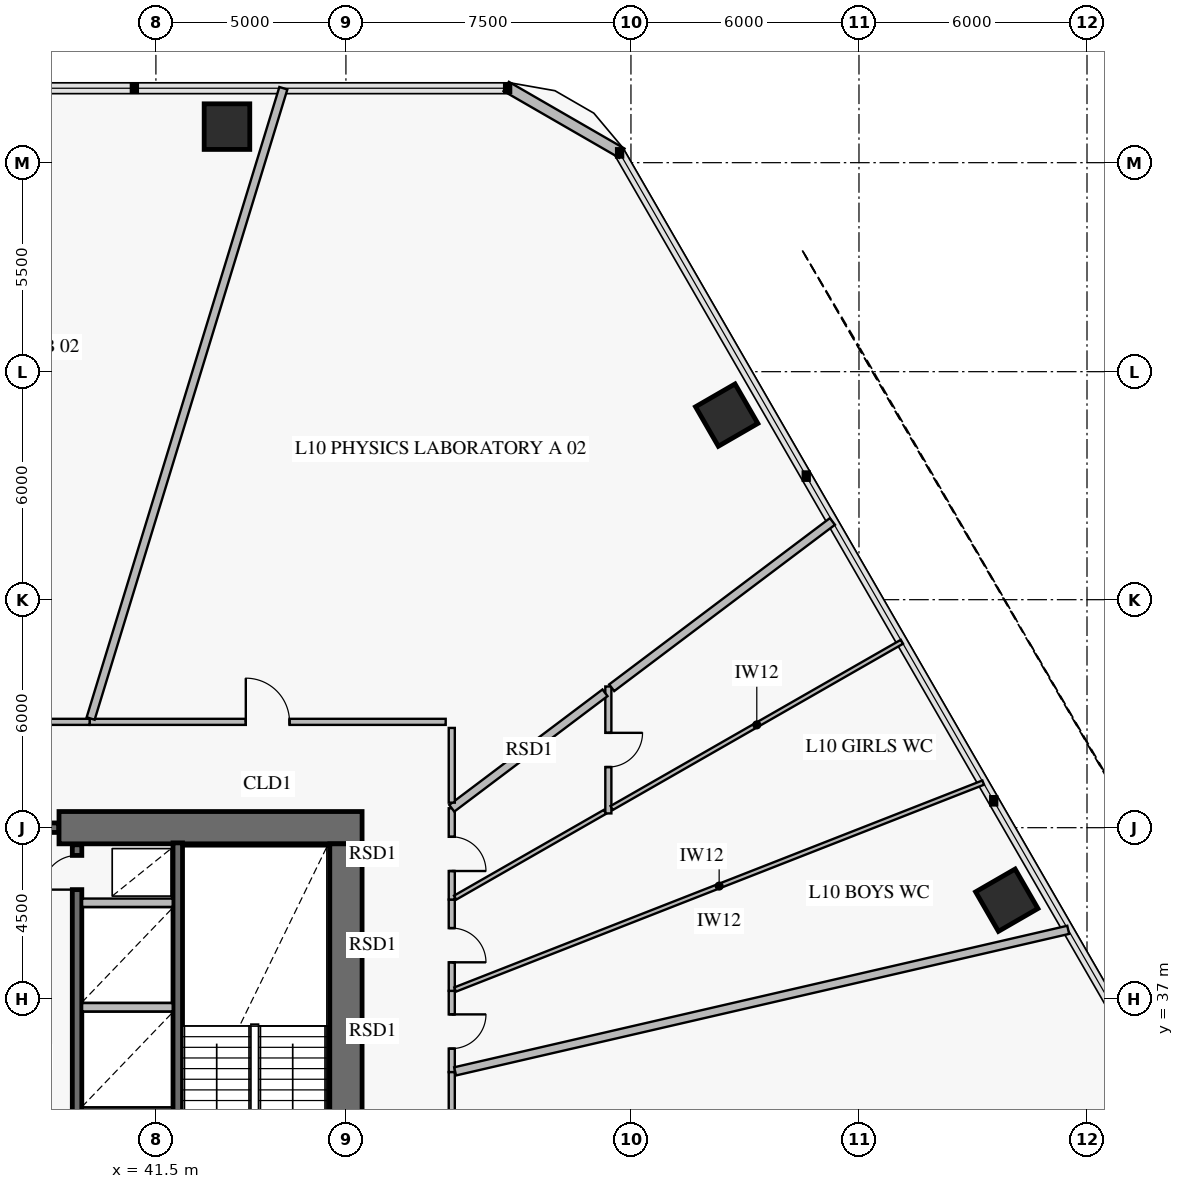
"""IFC4 building model, lengths in metres.
Left out: names, types, materials, properties, quantities, classifications, styles, units other than length and angle.
Written with IfcOpenShell. Run it as: python <this file> out.ifc"""

import sys

from ifc_helpers import new_model, si_unit, direction, frame, frame_2d, origin, origin_2d, place, context, subcontext, project, spatial, rectangle, extrude, element, fill, save


model = new_model("IFC4")
c1 = context("Model", 3, precision=1e-05, world=origin(), true_north=direction((0.0, 1.0)))
c2 = subcontext(c1, "Body", "Model", "MODEL_VIEW")
j1 = project(units=[si_unit("LENGTHUNIT", "METRE"), si_unit("PLANEANGLEUNIT", "RADIAN")], contexts=[c1])
p1 = place(None, origin())
s1 = spatial("IfcSite", under=j1, at=p1, CompositionType="ELEMENT")
p2 = place(p1, origin())
s2 = spatial("IfcBuilding", under=s1, at=p2, CompositionType="ELEMENT")
p3 = place(p2, frame((0.0, 0.0, 41.4)))
s3 = spatial("IfcBuildingStorey", under=s2, at=p3, CompositionType="ELEMENT", Elevation=41.4)
p4 = place(p3, frame((46.925, 41.5, 0.0), z_axis=(0.0, 0.0, 1.0), x_axis=(-1.0, 0.0, 0.0)))
e1 = element("IfcWall", 1, at=p4, inside=s3, PredefinedType="SHEAR", context=c2, shape_type="SweptSolid", body=[
    extrude(rectangle(XDim=7.975, YDim=0.85, at=frame_2d((3.988, 0.0))), origin(), (0.0, 0.0, 1.0), 4.2),
])
p5 = place(p3, frame((46.5, 22.925, 0.0), z_axis=(0.0, 0.0, 1.0), x_axis=(0.0, 1.0, 0.0)))
e2 = element("IfcWall", 2, at=p5, inside=s3, PredefinedType="SHEAR", context=c2, shape_type="SweptSolid", body=[
    extrude(rectangle(XDim=18.15, YDim=0.85, at=frame_2d((9.075, 0.0))), origin(), (0.0, 0.0, 1.0), 4.2),
])
p6 = place(p5, frame((8.825, 0.0, 0.0)))
e3 = element("IfcOpeningElement", 3, at=p6, cuts=e2, PredefinedType="OPENING", context=c2, shape_type="SweptSolid", body=[
    extrude(rectangle(XDim=1.1, YDim=2.15, at=frame_2d((0.55, 1.075))), frame((0.0, 0.437, 0.0), z_axis=(0.0, -1.0, 0.0), x_axis=(1.0, 0.0, 0.0)), (0.0, 0.0, 1.0), 0.874),
])
for number, where, z_axis, x_axis in (
    (4, (63.889, 39.592, 0.0), (0.0, 0.0, 1.0), (-0.5, 0.866, 0.0)),
    (5, (56.519, 52.357, 0.0), (0.0, 0.0, 1.0), (-0.5, 0.866, 0.0)),
    (6, (43.37, 59.948, 0.0), (0.0, 0.0, 1.0), (-1.0, 0.0, 0.0)),
):
    element("IfcColumn", number, at=place(p3, frame(where, z_axis=z_axis, x_axis=x_axis)), inside=s3, PredefinedType="COLUMN", context=c2, shape_type="SweptSolid", body=[
        extrude(rectangle(XDim=1.2, YDim=1.2, at=origin_2d()), origin(), (0.0, 0.0, 1.0), 3.92),
    ])
p7 = place(p3, frame((50.717, 61.006, 0.0), z_axis=(0.0, 0.0, 1.0), x_axis=(0.866007452331, -0.500031091541, 0.0)))
e7 = element("IfcWall", 7, at=p7, inside=s3, PredefinedType="SOLIDWALL", context=c2, shape_type="SweptSolid", body=[
    extrude(rectangle(XDim=3.515, YDim=0.28, at=frame_2d((1.757, 0.0))), origin(), (0.0, 0.0, 1.0), 3.92),
])
p8 = place(p3, frame((36.76, 41.5, 0.0), z_axis=(0.0, 0.0, 1.0), x_axis=(1.0, 0.0, 0.0)))
e8 = element("IfcWall", 8, at=p8, inside=s3, PredefinedType="SOLIDWALL", context=c2, shape_type="SweptSolid", body=[
    extrude(rectangle(XDim=2.18, YDim=0.25, at=frame_2d((1.09, 0.0))), origin(), (0.0, 0.0, 1.0), 4.2),
])
p9 = place(p8, frame((0.34, 0.0, 0.0)))
e9 = element("IfcOpeningElement", 9, at=p9, cuts=e8, PredefinedType="OPENING", context=c2, shape_type="SweptSolid", body=[
    extrude(rectangle(XDim=1.5, YDim=2.15, at=frame_2d((0.75, 1.075))), frame((0.0, 0.137, 0.0), z_axis=(0.0, -1.0, 0.0), x_axis=(1.0, 0.0, 0.0)), (0.0, 0.0, 1.0), 0.274),
])
p10 = place(p3, frame((42.075, 31.4, 0.0), z_axis=(0.0, 0.0, 1.0), x_axis=(0.0, 1.0, 0.0)))
e10 = element("IfcWall", 10, at=p10, inside=s3, PredefinedType="SOLIDWALL", context=c2, shape_type="SweptSolid", body=[
    extrude(rectangle(XDim=9.7, YDim=0.25, at=frame_2d((4.85, 0.0))), origin(), (0.0, 0.0, 1.0), 4.2),
])
p11 = place(p3, frame((39.425, 31.4, 0.0), z_axis=(0.0, 0.0, 1.0), x_axis=(0.0, 1.0, 0.0)))
e11 = element("IfcWall", 11, at=p11, inside=s3, PredefinedType="SOLIDWALL", context=c2, shape_type="SweptSolid", body=[
    extrude(rectangle(XDim=9.65, YDim=0.25, at=frame_2d((4.825, 0.0))), origin(), (0.0, 0.0, 1.0), 4.2),
])
p12 = place(p11, frame((8.47, 0.0, 0.0)))
e12 = element("IfcOpeningElement", 12, at=p12, cuts=e11, PredefinedType="OPENING", context=c2, shape_type="SweptSolid", body=[
    extrude(rectangle(XDim=0.9, YDim=2.1, at=frame_2d((0.45, 1.05))), frame((0.0, 0.137, 0.0), z_axis=(0.0, -1.0, 0.0), x_axis=(1.0, 0.0, 0.0)), (0.0, 0.0, 1.0), 0.274),
])
p13 = place(p3, frame((49.285, 35.067, 0.0), z_axis=(0.0, 0.0, 1.0), x_axis=(0.0, 1.0, 0.0)))
e13 = element("IfcWall", 13, at=p13, inside=s3, PredefinedType="PARTITIONING", context=c2, shape_type="SweptSolid", body=[
    extrude(rectangle(XDim=2.139, YDim=0.16, at=frame_2d((1.07, 0.0))), origin(), (0.0, 0.0, 1.0), 3.22),
])
p14 = place(p13, frame((0.62, 0.0, 0.0)))
e14 = element("IfcOpeningElement", 14, at=p14, cuts=e13, PredefinedType="OPENING", context=c2, shape_type="SweptSolid", body=[
    extrude(rectangle(XDim=0.9, YDim=2.1, at=frame_2d((0.45, 1.05))), frame((0.0, 0.092, 0.0), z_axis=(0.0, -1.0, 0.0), x_axis=(1.0, 0.0, 0.0)), (0.0, 0.0, 1.0), 0.184),
])
p15 = place(p3, frame((49.285, 37.206, 0.0), z_axis=(0.0, 0.0, 1.0), x_axis=(0.0, 1.0, 0.0)))
e15 = element("IfcWall", 15, at=p15, inside=s3, PredefinedType="PARTITIONING", context=c2, shape_type="SweptSolid", body=[
    extrude(rectangle(XDim=2.402, YDim=0.16, at=frame_2d((1.201, 0.0))), origin(), (0.0, 0.0, 1.0), 3.92),
])
p16 = place(p15, frame((0.751, 0.0, 0.0)))
e16 = element("IfcOpeningElement", 16, at=p16, cuts=e15, PredefinedType="OPENING", context=c2, shape_type="SweptSolid", body=[
    extrude(rectangle(XDim=0.9, YDim=2.1, at=frame_2d((0.45, 1.05))), frame((0.0, 0.092, 0.0), z_axis=(0.0, -1.0, 0.0), x_axis=(1.0, 0.0, 0.0)), (0.0, 0.0, 1.0), 0.184),
])
p17 = place(p3, frame((53.405, 45.216, 0.0), z_axis=(0.0, 0.0, 1.0), x_axis=(0.0, -1.0, 0.0)))
e17 = element("IfcWall", 17, at=p17, inside=s3, PredefinedType="PARTITIONING", context=c2, shape_type="SweptSolid", body=[
    extrude(rectangle(XDim=3.34, YDim=0.16, at=frame_2d((1.67, 0.0))), origin(), (0.0, 0.0, 1.0), 3.47),
])
p18 = place(p17, frame((1.22, 0.0, 0.0)))
e18 = element("IfcOpeningElement", 18, at=p18, cuts=e17, PredefinedType="OPENING", context=c2, shape_type="SweptSolid", body=[
    extrude(rectangle(XDim=0.9, YDim=2.1, at=frame_2d((0.45, 1.05))), frame((0.0, 0.092, 0.0), z_axis=(0.0, -1.0, 0.0), x_axis=(1.0, 0.0, 0.0)), (0.0, 0.0, 1.0), 0.184),
])
p19 = place(p3, frame((49.285, 39.608, 0.0), z_axis=(0.0, 0.0, 1.0), x_axis=(0.0, 1.0, 0.0)))
e19 = element("IfcWall", 19, at=p19, inside=s3, PredefinedType="PARTITIONING", context=c2, shape_type="SweptSolid", body=[
    extrude(rectangle(XDim=2.403, YDim=0.16, at=frame_2d((1.201, 0.0))), origin(), (0.0, 0.0, 1.0), 3.92),
])
p20 = place(p19, frame((0.751, 0.0, 0.0)))
e20 = element("IfcOpeningElement", 20, at=p20, cuts=e19, PredefinedType="OPENING", context=c2, shape_type="SweptSolid", body=[
    extrude(rectangle(XDim=0.9, YDim=2.1, at=frame_2d((0.45, 1.05))), frame((0.0, 0.092, 0.0), z_axis=(0.0, -1.0, 0.0), x_axis=(1.0, 0.0, 0.0)), (0.0, 0.0, 1.0), 0.184),
])
p21 = place(p3, frame((49.125, 44.285, 0.0), z_axis=(0.0, 0.0, 1.0), x_axis=(-1.0, 0.0, 0.0)))
e21 = element("IfcWall", 21, at=p21, inside=s3, PredefinedType="PARTITIONING", context=c2, shape_type="SweptSolid", body=[
    extrude(rectangle(XDim=9.369, YDim=0.16, at=frame_2d((4.685, 0.0))), origin(), (0.0, 0.0, 1.0), 3.22),
])
p22 = place(p21, frame((4.11, 0.0, 0.0)))
e22 = element("IfcOpeningElement", 22, at=p22, cuts=e21, PredefinedType="OPENING", context=c2, shape_type="SweptSolid", body=[
    extrude(rectangle(XDim=1.15, YDim=2.2, at=frame_2d((0.575, 1.1))), frame((0.0, 0.092, 0.0), z_axis=(0.0, -1.0, 0.0), x_axis=(1.0, 0.0, 0.0)), (0.0, 0.0, 1.0), 0.184),
])
p23 = place(p3, frame((39.756, 44.285, 0.0), z_axis=(0.0, 0.0, 1.0), x_axis=(-1.0, 0.0, 0.0)))
e23 = element("IfcWall", 23, at=p23, inside=s3, PredefinedType="PARTITIONING", context=c2, shape_type="SweptSolid", body=[
    extrude(rectangle(XDim=7.986, YDim=0.16, at=frame_2d((3.993, 0.0))), origin(), (0.0, 0.0, 1.0), 3.22),
])
p24 = place(p23, frame((3.418, 0.0, 0.0)))
e24 = element("IfcOpeningElement", 24, at=p24, cuts=e23, PredefinedType="OPENING", context=c2, shape_type="SweptSolid", body=[
    extrude(rectangle(XDim=1.15, YDim=2.2, at=frame_2d((0.575, 1.1))), frame((0.0, 0.092, 0.0), z_axis=(0.0, -1.0, 0.0), x_axis=(1.0, 0.0, 0.0)), (0.0, 0.0, 1.0), 0.184),
])
p25 = place(p3, frame((49.285, 21.989, 0.0), z_axis=(0.0, 0.0, 1.0), x_axis=(0.0, 1.0, 0.0)))
e25 = element("IfcWall", 25, at=p25, inside=s3, PredefinedType="PARTITIONING", context=c2, shape_type="SweptSolid", body=[
    extrude(rectangle(XDim=13.078, YDim=0.16, at=frame_2d((6.539, 0.0))), origin(), (0.0, 0.0, 1.0), 3.22),
])
p26 = place(p25, frame((6.064, 0.0, 0.0)))
e26 = element("IfcOpeningElement", 26, at=p26, cuts=e25, PredefinedType="OPENING", context=c2, shape_type="SweptSolid", body=[
    extrude(rectangle(XDim=0.95, YDim=2.1, at=frame_2d((0.475, 1.05))), frame((0.0, 0.092, 0.0), z_axis=(0.0, -1.0, 0.0), x_axis=(1.0, 0.0, 0.0)), (0.0, 0.0, 1.0), 0.184),
])
for number, where, z_axis, x_axis in (
    (27, (39.558, 34.025, 0.0), (0.0, 0.0, 1.0), (1.0, 0.0, 0.0)),
    (28, (39.558, 36.775, 0.0), (0.0, 0.0, 1.0), (1.0, 0.0, 0.0)),
    (29, (39.558, 39.525, 0.0), (0.0, 0.0, 1.0), (1.0, 0.0, 0.0)),
):
    element("IfcWall", number, at=place(p3, frame(where, z_axis=z_axis, x_axis=x_axis)), inside=s3, PredefinedType="PARTITIONING", context=c2, shape_type="SweptSolid", body=[
        extrude(rectangle(XDim=2.384, YDim=0.22, at=frame_2d((1.192, 0.0))), origin(), (0.0, 0.0, 1.0), 3.92),
    ])
p27 = place(p3, frame((49.373, 35.087, 0.0), z_axis=(0.0, 0.0, 1.0), x_axis=(0.974368575461, 0.224957505217, 0.0)))
e30 = element("IfcWall", 30, at=p27, inside=s3, PredefinedType="PARTITIONING", context=c2, shape_type="SweptSolid", body=[
    extrude(rectangle(XDim=16.557, YDim=0.22, at=frame_2d((8.278, 0.0))), origin(), (0.0, 0.0, 1.0), 3.17),
])
p28 = place(p3, frame((49.373, 37.241, 0.0), z_axis=(0.0, 0.0, 1.0), x_axis=(0.931056574404, 0.364874848761, 0.0)))
e31 = element("IfcWall", 31, at=p28, inside=s3, PredefinedType="PARTITIONING", context=c2, shape_type="SweptSolid", body=[
    extrude(rectangle(XDim=14.925, YDim=0.12, at=frame_2d((7.462, 0.0))), origin(), (0.0, 0.0, 1.0), 3.17),
])
p29 = place(p3, frame((49.373, 39.659, 0.0), z_axis=(0.0, 0.0, 1.0), x_axis=(0.867753476972, 0.496994872412, 0.0)))
e32 = element("IfcWall", 32, at=p29, inside=s3, PredefinedType="PARTITIONING", context=c2, shape_type="SweptSolid", body=[
    extrude(rectangle(XDim=4.545, YDim=0.12, at=frame_2d((2.272, 0.0))), origin(), (0.0, 0.0, 1.0), 3.92),
])
p30 = place(p3, frame((53.493, 42.018, 0.0), z_axis=(0.0, 0.0, 1.0), x_axis=(0.867773256473, 0.496960335791, 0.0)))
e33 = element("IfcWall", 33, at=p30, inside=s3, PredefinedType="PARTITIONING", context=c2, shape_type="SweptSolid", body=[
    extrude(rectangle(XDim=8.8, YDim=0.12, at=frame_2d((4.4, 0.0))), origin(), (0.0, 0.0, 1.0), 3.17),
])
p31 = place(p3, frame((49.285, 42.011, 0.0), z_axis=(0.0, 0.0, 1.0), x_axis=(0.798634234908, 0.601816715315, 0.0)))
e34 = element("IfcWall", 34, at=p31, inside=s3, PredefinedType="PARTITIONING", context=c2, shape_type="SweptSolid", body=[
    extrude(rectangle(XDim=5.049, YDim=0.22, at=frame_2d((2.524, 0.0))), origin(), (0.0, 0.0, 1.0), 3.47),
])
p32 = place(p3, frame((53.493, 45.182, 0.0), z_axis=(0.0, 0.0, 1.0), x_axis=(0.798624171574, 0.60183006952, 0.0)))
e35 = element("IfcWall", 35, at=p32, inside=s3, PredefinedType="PARTITIONING", context=c2, shape_type="SweptSolid", body=[
    extrude(rectangle(XDim=7.272, YDim=0.22, at=frame_2d((3.636, 0.0))), origin(), (0.0, 0.0, 1.0), 3.17),
])
p33 = place(p3, frame((39.783, 44.373, 0.0), z_axis=(0.0, 0.0, 1.0), x_axis=(0.29237803707, 0.956302819947, 0.0)))
e36 = element("IfcWall", 36, at=p33, inside=s3, PredefinedType="PARTITIONING", context=c2, shape_type="SweptSolid", body=[
    extrude(rectangle(XDim=17.343, YDim=0.22, at=frame_2d((8.672, 0.0))), origin(), (0.0, 0.0, 1.0), 3.17),
])
p34 = place(p3, frame((49.285, 42.159, 0.0), z_axis=(0.0, 0.0, 1.0), x_axis=(0.0, 1.0, 0.0)))
e37 = element("IfcWall", 37, at=p34, inside=s3, PredefinedType="PARTITIONING", context=c2, shape_type="SweptSolid", body=[
    extrude(rectangle(XDim=1.966, YDim=0.16, at=frame_2d((0.983, 0.0))), origin(), (0.0, 0.0, 1.0), 3.92),
])
p35 = place(p12, origin())
e38 = element("IfcDoor", 38, at=p35, inside=s3, OperationType="SINGLE_SWING_LEFT", PredefinedType="DOOR", context=c2, shape_type="SweptSolid", body=[
    extrude(rectangle(XDim=0.9, YDim=2.1, at=frame_2d((0.45, 1.05))), frame((0.0, 0.025, 0.0), z_axis=(0.0, -1.0, 0.0), x_axis=(1.0, 0.0, 0.0)), (0.0, 0.0, 1.0), 0.05),
])
fill(e12, e38)
p36 = place(p14, frame((0.9, 0.0, 0.0), z_axis=(0.0, 0.0, 1.0), x_axis=(-1.0, 0.0, 0.0)))
e39 = element("IfcDoor", 39, at=p36, inside=s3, OperationType="SINGLE_SWING_LEFT", PredefinedType="DOOR", context=c2, shape_type="SweptSolid", body=[
    extrude(rectangle(XDim=0.9, YDim=2.1, at=frame_2d((0.45, 1.05))), frame((0.0, 0.025, 0.0), z_axis=(0.0, -1.0, 0.0), x_axis=(1.0, 0.0, 0.0)), (0.0, 0.0, 1.0), 0.05),
])
fill(e14, e39)
p37 = place(p16, frame((0.9, 0.0, 0.0), z_axis=(0.0, 0.0, 1.0), x_axis=(-1.0, 0.0, 0.0)))
e40 = element("IfcDoor", 40, at=p37, inside=s3, OperationType="SINGLE_SWING_RIGHT", PredefinedType="DOOR", context=c2, shape_type="SweptSolid", body=[
    extrude(rectangle(XDim=0.9, YDim=2.1, at=frame_2d((0.45, 1.05))), frame((0.0, 0.025, 0.0), z_axis=(0.0, -1.0, 0.0), x_axis=(1.0, 0.0, 0.0)), (0.0, 0.0, 1.0), 0.05),
])
fill(e16, e40)
p38 = place(p18, origin())
e41 = element("IfcDoor", 41, at=p38, inside=s3, OperationType="SINGLE_SWING_LEFT", PredefinedType="DOOR", context=c2, shape_type="SweptSolid", body=[
    extrude(rectangle(XDim=0.9, YDim=2.1, at=frame_2d((0.45, 1.05))), frame((0.0, 0.025, 0.0), z_axis=(0.0, -1.0, 0.0), x_axis=(1.0, 0.0, 0.0)), (0.0, 0.0, 1.0), 0.05),
])
fill(e18, e41)
p39 = place(p20, frame((0.9, 0.0, 0.0), z_axis=(0.0, 0.0, 1.0), x_axis=(-1.0, 0.0, 0.0)))
e42 = element("IfcDoor", 42, at=p39, inside=s3, OperationType="SINGLE_SWING_RIGHT", PredefinedType="DOOR", context=c2, shape_type="SweptSolid", body=[
    extrude(rectangle(XDim=0.9, YDim=2.1, at=frame_2d((0.45, 1.05))), frame((0.0, 0.025, 0.0), z_axis=(0.0, -1.0, 0.0), x_axis=(1.0, 0.0, 0.0)), (0.0, 0.0, 1.0), 0.05),
])
fill(e20, e42)
p40 = place(p22, frame((1.15, 0.0, 0.0), z_axis=(0.0, 0.0, 1.0), x_axis=(-1.0, 0.0, 0.0)))
e43 = element("IfcDoor", 43, at=p40, inside=s3, OperationType="SINGLE_SWING_LEFT", PredefinedType="DOOR", context=c2, shape_type="SweptSolid", body=[
    extrude(rectangle(XDim=1.15, YDim=2.2, at=frame_2d((0.575, 1.1))), frame((0.0, 0.025, 0.0), z_axis=(0.0, -1.0, 0.0), x_axis=(1.0, 0.0, 0.0)), (0.0, 0.0, 1.0), 0.05),
])
fill(e22, e43)
save(model, sys.argv[1])
